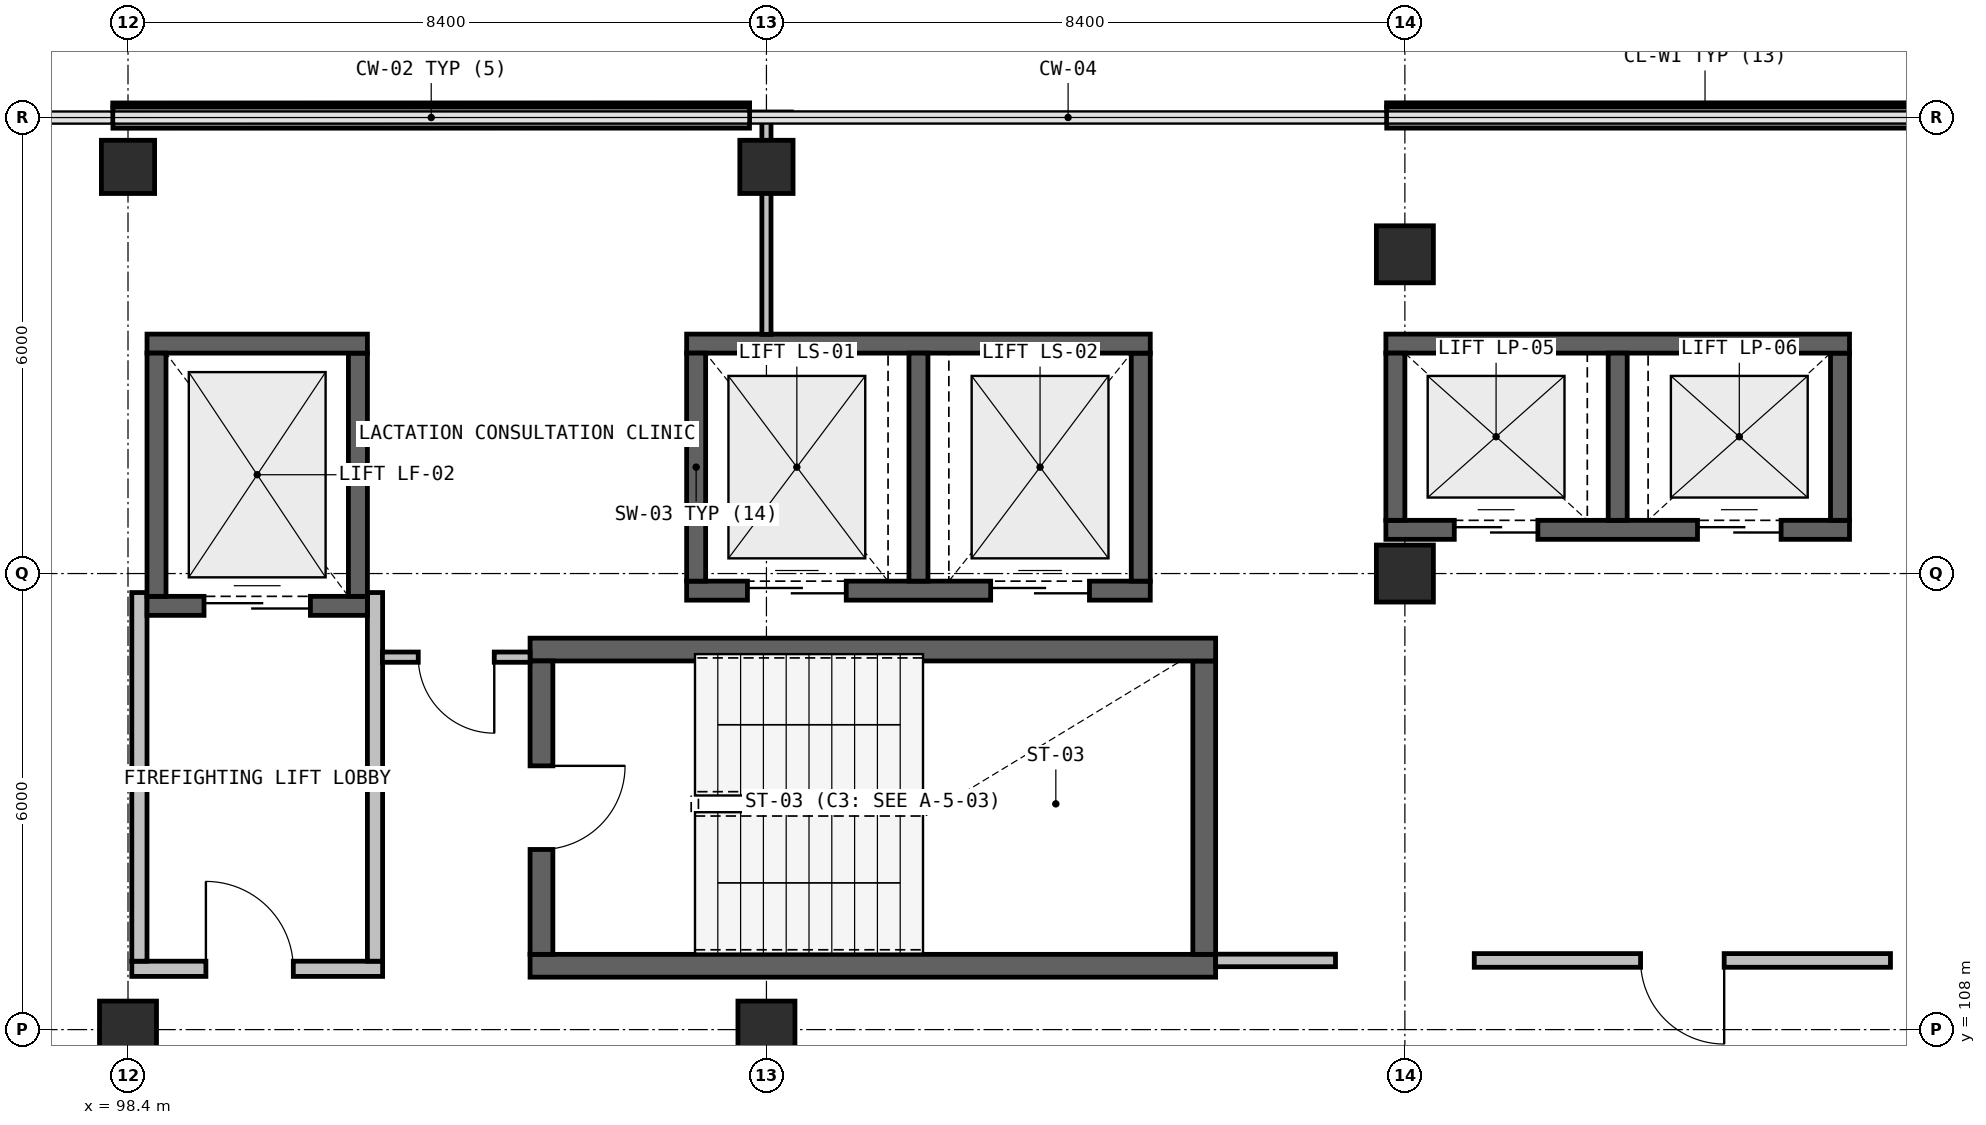
"""IFC4 building model, lengths in metres.
Left out: names, types, materials, properties, quantities, classifications, styles, units other than length and angle.
Written with IfcOpenShell. Run it as: python <this file> out.ifc"""

import sys

from ifc_helpers import new_model, si_unit, direction, frame, frame_2d, origin, origin_2d, place, context, subcontext, project, spatial, rectangle, extrude, element, fill, save


model = new_model("IFC4")
c1 = context("Model", 3, precision=1e-05, world=origin(), true_north=direction((0.0, 1.0)))
c2 = subcontext(c1, "Body", "Model", "MODEL_VIEW")
j1 = project(units=[si_unit("LENGTHUNIT", "METRE"), si_unit("PLANEANGLEUNIT", "RADIAN")], contexts=[c1])
p1 = place(None, origin())
s1 = spatial("IfcSite", under=j1, at=p1, CompositionType="ELEMENT")
p2 = place(p1, origin())
s2 = spatial("IfcBuilding", under=s1, at=p2, CompositionType="ELEMENT")
p3 = place(p2, frame((0.0, 0.0, 19.2)))
s3 = spatial("IfcBuildingStorey", under=s2, at=p3, CompositionType="ELEMENT", Elevation=19.2)
for number, where, z_axis, x_axis in (
    (1, (115.2, 118.2, 0.0), (0.0, 0.0, 1.0), (1.0, 0.0, 0.0)),
    (2, (98.4, 108.0, 0.0), (0.0, 0.0, 1.0), (1.0, 0.0, 0.0)),
):
    element("IfcColumn", number, at=place(p3, frame(where, z_axis=z_axis, x_axis=x_axis)), inside=s3, PredefinedType="COLUMN", context=c2, shape_type="SweptSolid", body=[
        extrude(rectangle(XDim=0.75, YDim=0.75, at=origin_2d()), origin(), (0.0, 0.0, 1.0), 4.05),
    ])
p4 = place(p3, frame((98.4, 119.35, 0.0), z_axis=(0.0, 0.0, 1.0), x_axis=(1.0, 0.0, 0.0)))
e3 = element("IfcColumn", 3, at=p4, inside=s3, PredefinedType="COLUMN", context=c2, shape_type="SweptSolid", body=[
    extrude(rectangle(XDim=0.7, YDim=0.7, at=origin_2d()), origin(), (0.0, 0.0, 1.0), 4.05),
])
p5 = place(p3, frame((106.8, 108.0, 0.0), z_axis=(0.0, 0.0, 1.0), x_axis=(1.0, 0.0, 0.0)))
e4 = element("IfcColumn", 4, at=p5, inside=s3, PredefinedType="COLUMN", context=c2, shape_type="SweptSolid", body=[
    extrude(rectangle(XDim=0.75, YDim=0.75, at=origin_2d()), origin(), (0.0, 0.0, 1.0), 4.05),
])
p6 = place(p3, frame((106.8, 119.35, 0.0), z_axis=(0.0, 0.0, 1.0), x_axis=(1.0, 0.0, 0.0)))
e5 = element("IfcColumn", 5, at=p6, inside=s3, PredefinedType="COLUMN", context=c2, shape_type="SweptSolid", body=[
    extrude(rectangle(XDim=0.7, YDim=0.7, at=origin_2d()), origin(), (0.0, 0.0, 1.0), 4.05),
])
p7 = place(p3, frame((115.2, 114.0, 0.0), z_axis=(0.0, 0.0, 1.0), x_axis=(1.0, 0.0, 0.0)))
e6 = element("IfcColumn", 6, at=p7, inside=s3, PredefinedType="COLUMN", context=c2, shape_type="SweptSolid", body=[
    extrude(rectangle(XDim=0.75, YDim=0.75, at=origin_2d()), origin(), (0.0, 0.0, 1.0), 4.05),
])
p8 = place(p3, frame((98.202, 119.999, 0.0), z_axis=(0.0, 0.0, 1.0), x_axis=(0.999999993202, 0.000116604477, 0.0)))
e7 = element("IfcWall", 7, at=p8, inside=s3, PredefinedType="SOLIDWALL", context=c2, shape_type="SweptSolid", body=[
    extrude(rectangle(XDim=8.375, YDim=0.28, at=frame_2d((4.188, 0.0))), origin(), (0.0, 0.0, 1.0), 0.94),
])
p9 = place(p3, frame((114.961, 120.0, 0.0), z_axis=(0.0, 0.0, 1.0), x_axis=(1.0, 0.0, 0.0)))
e8 = element("IfcWall", 8, at=p9, inside=s3, PredefinedType="SOLIDWALL", context=c2, shape_type="SweptSolid", body=[
    extrude(rectangle(XDim=8.376, YDim=0.28, at=frame_2d((4.188, 0.0))), origin(), (0.0, 0.0, 1.0), 0.94),
])
p10 = place(p3, frame((98.45, 108.8, 0.0), z_axis=(0.0, 0.0, 1.0), x_axis=(1.0, 0.0, 0.0)))
e9 = element("IfcWall", 9, at=p10, inside=s3, PredefinedType="SOLIDWALL", context=c2, shape_type="SweptSolid", body=[
    extrude(rectangle(XDim=3.3, YDim=0.2, at=frame_2d((1.65, 0.0))), origin(), (0.0, 0.0, 1.0), 3.77),
])
p11 = place(p10, frame((0.975, 0.0, 0.0)))
e10 = element("IfcOpeningElement", 10, at=p11, cuts=e9, PredefinedType="OPENING", context=c2, shape_type="SweptSolid", body=[
    extrude(rectangle(XDim=1.15, YDim=2.15, at=frame_2d((0.575, 1.075))), frame((0.0, 0.11, 0.0), z_axis=(0.0, -1.0, 0.0), x_axis=(1.0, 0.0, 0.0)), (0.0, 0.0, 1.0), 0.22),
])
p12 = place(p3, frame((101.65, 108.9, 0.0), z_axis=(0.0, 0.0, 1.0), x_axis=(0.0, 1.0, 0.0)))
e11 = element("IfcWall", 11, at=p12, inside=s3, PredefinedType="SOLIDWALL", context=c2, shape_type="SweptSolid", body=[
    extrude(rectangle(XDim=4.85, YDim=0.2, at=frame_2d((2.425, 0.0))), origin(), (0.0, 0.0, 1.0), 3.77),
])
p13 = place(p3, frame((98.55, 113.75, 0.0), z_axis=(0.0, 0.0, 1.0), x_axis=(0.0, -1.0, 0.0)))
e12 = element("IfcWall", 12, at=p13, inside=s3, PredefinedType="SOLIDWALL", context=c2, shape_type="SweptSolid", body=[
    extrude(rectangle(XDim=4.85, YDim=0.2, at=frame_2d((2.425, 0.0))), origin(), (0.0, 0.0, 1.0), 3.12),
])
p14 = place(p3, frame((103.69, 108.84, 0.0), z_axis=(0.0, 0.0, 1.0), x_axis=(1.0, 0.0, 0.0)))
e13 = element("IfcWall", 13, at=p14, inside=s3, PredefinedType="SHEAR", context=c2, shape_type="SweptSolid", body=[
    extrude(rectangle(XDim=9.02, YDim=0.3, at=frame_2d((4.51, 0.0))), origin(), (0.0, 0.0, 1.0), 3.77),
])
p15 = place(p3, frame((112.56, 108.99, 0.0), z_axis=(0.0, 0.0, 1.0), x_axis=(0.0, 1.0, 0.0)))
e14 = element("IfcWall", 14, at=p15, inside=s3, PredefinedType="SHEAR", context=c2, shape_type="SweptSolid", body=[
    extrude(rectangle(XDim=3.86, YDim=0.3, at=frame_2d((1.93, 0.0))), origin(), (0.0, 0.0, 1.0), 3.77),
])
p16 = place(p3, frame((112.71, 113.0, 0.0), z_axis=(0.0, 0.0, 1.0), x_axis=(-1.0, 0.0, 0.0)))
e15 = element("IfcWall", 15, at=p16, inside=s3, PredefinedType="SHEAR", context=c2, shape_type="SweptSolid", body=[
    extrude(rectangle(XDim=9.02, YDim=0.3, at=frame_2d((4.51, 0.0))), origin(), (0.0, 0.0, 1.0), 3.77),
])
p17 = place(p3, frame((103.84, 112.85, 0.0), z_axis=(0.0, 0.0, 1.0), x_axis=(0.0, -1.0, 0.0)))
e16 = element("IfcWall", 16, at=p17, inside=s3, PredefinedType="SHEAR", context=c2, shape_type="SweptSolid", body=[
    extrude(rectangle(XDim=3.86, YDim=0.3, at=frame_2d((1.93, 0.0))), origin(), (0.0, 0.0, 1.0), 3.77),
])
p18 = place(p17, frame((1.38, 0.0, 0.0)))
e17 = element("IfcOpeningElement", 17, at=p18, cuts=e16, PredefinedType="OPENING", context=c2, shape_type="SweptSolid", body=[
    extrude(rectangle(XDim=1.1, YDim=2.15, at=frame_2d((0.55, 1.075))), frame((0.0, 0.16, 0.0), z_axis=(0.0, -1.0, 0.0), x_axis=(1.0, 0.0, 0.0)), (0.0, 0.0, 1.0), 0.32),
])
p19 = place(p3, frame((98.65, 113.575, 0.0), z_axis=(0.0, 0.0, 1.0), x_axis=(1.0, 0.0, 0.0)))
e18 = element("IfcWall", 18, at=p19, inside=s3, PredefinedType="SHEAR", context=c2, shape_type="SweptSolid", body=[
    extrude(rectangle(XDim=2.9, YDim=0.25, at=frame_2d((1.45, 0.0))), origin(), (0.0, 0.0, 1.0), 3.77),
])
p20 = place(p19, frame((0.75, 0.0, 0.0)))
e19 = element("IfcOpeningElement", 19, at=p20, cuts=e18, PredefinedType="OPENING", context=c2, shape_type="SweptSolid", body=[
    extrude(rectangle(XDim=1.4, YDim=2.15, at=frame_2d((0.7, 1.075))), frame((0.0, 0.135, 0.0), z_axis=(0.0, -1.0, 0.0), x_axis=(1.0, 0.0, 0.0)), (0.0, 0.0, 1.0), 0.27),
])
p21 = place(p3, frame((101.425, 113.7, 0.0), z_axis=(0.0, 0.0, 1.0), x_axis=(0.0, 1.0, 0.0)))
e20 = element("IfcWall", 20, at=p21, inside=s3, PredefinedType="SHEAR", context=c2, shape_type="SweptSolid", body=[
    extrude(rectangle(XDim=3.2, YDim=0.25, at=frame_2d((1.6, 0.0))), origin(), (0.0, 0.0, 1.0), 3.77),
])
p22 = place(p3, frame((101.55, 117.025, 0.0), z_axis=(0.0, 0.0, 1.0), x_axis=(-1.0, 0.0, 0.0)))
e21 = element("IfcWall", 21, at=p22, inside=s3, PredefinedType="SHEAR", context=c2, shape_type="SweptSolid", body=[
    extrude(rectangle(XDim=2.9, YDim=0.25, at=frame_2d((1.45, 0.0))), origin(), (0.0, 0.0, 1.0), 3.77),
])
p23 = place(p3, frame((98.775, 116.9, 0.0), z_axis=(0.0, 0.0, 1.0), x_axis=(0.0, -1.0, 0.0)))
e22 = element("IfcWall", 22, at=p23, inside=s3, PredefinedType="SHEAR", context=c2, shape_type="SweptSolid", body=[
    extrude(rectangle(XDim=3.2, YDim=0.25, at=frame_2d((1.6, 0.0))), origin(), (0.0, 0.0, 1.0), 3.77),
])
p24 = place(p3, frame((105.75, 113.775, 0.0), z_axis=(0.0, 0.0, 1.0), x_axis=(1.0, 0.0, 0.0)))
e23 = element("IfcWall", 23, at=p24, inside=s3, PredefinedType="SHEAR", context=c2, shape_type="SweptSolid", body=[
    extrude(rectangle(XDim=6.1, YDim=0.25, at=frame_2d((3.05, 0.0))), origin(), (0.0, 0.0, 1.0), 3.77),
])
p25 = place(p24, frame((0.8, 0.0, 0.0)))
e24 = element("IfcOpeningElement", 24, at=p25, cuts=e23, PredefinedType="OPENING", context=c2, shape_type="SweptSolid", body=[
    extrude(rectangle(XDim=1.3, YDim=2.15, at=frame_2d((0.65, 1.075))), frame((0.0, 0.135, 0.0), z_axis=(0.0, -1.0, 0.0), x_axis=(1.0, 0.0, 0.0)), (0.0, 0.0, 1.0), 0.27),
])
p26 = place(p24, frame((4.0, 0.0, 0.0)))
e25 = element("IfcOpeningElement", 25, at=p26, cuts=e23, PredefinedType="OPENING", context=c2, shape_type="SweptSolid", body=[
    extrude(rectangle(XDim=1.3, YDim=2.15, at=frame_2d((0.65, 1.075))), frame((0.0, 0.135, 0.0), z_axis=(0.0, -1.0, 0.0), x_axis=(1.0, 0.0, 0.0)), (0.0, 0.0, 1.0), 0.27),
])
p27 = place(p3, frame((111.725, 113.9, 0.0), z_axis=(0.0, 0.0, 1.0), x_axis=(0.0, 1.0, 0.0)))
e26 = element("IfcWall", 26, at=p27, inside=s3, PredefinedType="SHEAR", context=c2, shape_type="SweptSolid", body=[
    extrude(rectangle(XDim=3.0, YDim=0.25, at=frame_2d((1.5, 0.0))), origin(), (0.0, 0.0, 1.0), 3.77),
])
p28 = place(p3, frame((111.85, 117.025, 0.0), z_axis=(0.0, 0.0, 1.0), x_axis=(-1.0, 0.0, 0.0)))
e27 = element("IfcWall", 27, at=p28, inside=s3, PredefinedType="SHEAR", context=c2, shape_type="SweptSolid", body=[
    extrude(rectangle(XDim=6.1, YDim=0.25, at=frame_2d((3.05, 0.0))), origin(), (0.0, 0.0, 1.0), 3.77),
])
for number, where, z_axis, x_axis in (
    (28, (105.875, 116.9, 0.0), (0.0, 0.0, 1.0), (0.0, -1.0, 0.0)),
    (29, (108.8, 113.9, 0.0), (0.0, 0.0, 1.0), (0.0, 1.0, 0.0)),
):
    element("IfcWall", number, at=place(p3, frame(where, z_axis=z_axis, x_axis=x_axis)), inside=s3, PredefinedType="SHEAR", context=c2, shape_type="SweptSolid", body=[
        extrude(rectangle(XDim=3.0, YDim=0.25, at=frame_2d((1.5, 0.0))), origin(), (0.0, 0.0, 1.0), 3.77),
    ])
p29 = place(p3, frame((114.95, 114.575, 0.0), z_axis=(0.0, 0.0, 1.0), x_axis=(1.0, 0.0, 0.0)))
e30 = element("IfcWall", 30, at=p29, inside=s3, PredefinedType="SHEAR", context=c2, shape_type="SweptSolid", body=[
    extrude(rectangle(XDim=6.1, YDim=0.25, at=frame_2d((3.05, 0.0))), origin(), (0.0, 0.0, 1.0), 3.77),
])
p30 = place(p29, frame((0.9, 0.0, 0.0)))
e31 = element("IfcOpeningElement", 31, at=p30, cuts=e30, PredefinedType="OPENING", context=c2, shape_type="SweptSolid", body=[
    extrude(rectangle(XDim=1.1, YDim=2.15, at=frame_2d((0.55, 1.075))), frame((0.0, 0.135, 0.0), z_axis=(0.0, -1.0, 0.0), x_axis=(1.0, 0.0, 0.0)), (0.0, 0.0, 1.0), 0.27),
])
p31 = place(p29, frame((4.1, 0.0, 0.0)))
e32 = element("IfcOpeningElement", 32, at=p31, cuts=e30, PredefinedType="OPENING", context=c2, shape_type="SweptSolid", body=[
    extrude(rectangle(XDim=1.1, YDim=2.15, at=frame_2d((0.55, 1.075))), frame((0.0, 0.135, 0.0), z_axis=(0.0, -1.0, 0.0), x_axis=(1.0, 0.0, 0.0)), (0.0, 0.0, 1.0), 0.27),
])
p32 = place(p3, frame((120.925, 114.7, 0.0), z_axis=(0.0, 0.0, 1.0), x_axis=(0.0, 1.0, 0.0)))
e33 = element("IfcWall", 33, at=p32, inside=s3, PredefinedType="SHEAR", context=c2, shape_type="SweptSolid", body=[
    extrude(rectangle(XDim=2.2, YDim=0.25, at=frame_2d((1.1, 0.0))), origin(), (0.0, 0.0, 1.0), 3.77),
])
p33 = place(p3, frame((121.05, 117.025, 0.0), z_axis=(0.0, 0.0, 1.0), x_axis=(-1.0, 0.0, 0.0)))
e34 = element("IfcWall", 34, at=p33, inside=s3, PredefinedType="SHEAR", context=c2, shape_type="SweptSolid", body=[
    extrude(rectangle(XDim=6.1, YDim=0.25, at=frame_2d((3.05, 0.0))), origin(), (0.0, 0.0, 1.0), 3.77),
])
for number, where, z_axis, x_axis in (
    (35, (115.075, 116.9, 0.0), (0.0, 0.0, 1.0), (0.0, -1.0, 0.0)),
    (36, (118.0, 114.7, 0.0), (0.0, 0.0, 1.0), (0.0, 1.0, 0.0)),
):
    element("IfcWall", number, at=place(p3, frame(where, z_axis=z_axis, x_axis=x_axis)), inside=s3, PredefinedType="SHEAR", context=c2, shape_type="SweptSolid", body=[
        extrude(rectangle(XDim=2.2, YDim=0.25, at=frame_2d((1.1, 0.0))), origin(), (0.0, 0.0, 1.0), 3.77),
    ])
p34 = place(p3, frame((103.69, 112.9, 0.0), z_axis=(0.0, 0.0, 1.0), x_axis=(-1.0, 0.0, 0.0)))
e37 = element("IfcWall", 37, at=p34, inside=s3, PredefinedType="PARTITIONING", context=c2, shape_type="SweptSolid", body=[
    extrude(rectangle(XDim=1.943, YDim=0.135, at=frame_2d((0.971, 0.0))), origin(), (0.0, 0.0, 1.0), 3.77),
])
p35 = place(p34, frame((0.471, 0.0, 0.0)))
e38 = element("IfcOpeningElement", 38, at=p35, cuts=e37, PredefinedType="OPENING", context=c2, shape_type="SweptSolid", body=[
    extrude(rectangle(XDim=1.0, YDim=2.15, at=frame_2d((0.5, 1.075))), frame((0.0, 0.077, 0.0), z_axis=(0.0, -1.0, 0.0), x_axis=(1.0, 0.0, 0.0)), (0.0, 0.0, 1.0), 0.155),
])
p36 = place(p3, frame((106.8, 119.989, 0.0), z_axis=(0.0, 0.0, 1.0), x_axis=(0.0, -1.0, 0.0)))
e39 = element("IfcWall", 39, at=p36, inside=s3, PredefinedType="PARTITIONING", context=c2, shape_type="SweptSolid", body=[
    extrude(rectangle(XDim=2.842, YDim=0.12, at=frame_2d((1.421, 0.0))), origin(), (0.0, 0.0, 1.0), 3.77),
])
p37 = place(p3, frame((121.589, 108.91, 0.0), z_axis=(0.0, 0.0, 1.0), x_axis=(-1.0, 0.0, 0.0)))
e40 = element("IfcWall", 40, at=p37, inside=s3, PredefinedType="PARTITIONING", context=c2, shape_type="SweptSolid", body=[
    extrude(rectangle(XDim=5.476, YDim=0.18, at=frame_2d((2.738, 0.0))), origin(), (0.0, 0.0, 1.0), 3.77),
])
p38 = place(p37, frame((2.188, 0.0, 0.0)))
e41 = element("IfcOpeningElement", 41, at=p38, cuts=e40, PredefinedType="OPENING", context=c2, shape_type="SweptSolid", body=[
    extrude(rectangle(XDim=1.1, YDim=2.15, at=frame_2d((0.55, 1.075))), frame((0.0, 0.1, 0.0), z_axis=(0.0, -1.0, 0.0), x_axis=(1.0, 0.0, 0.0)), (0.0, 0.0, 1.0), 0.2),
])
p39 = place(p3, frame((114.287, 108.91, 0.0), z_axis=(0.0, 0.0, 1.0), x_axis=(-1.0, 0.0, 0.0)))
e42 = element("IfcWall", 42, at=p39, inside=s3, PredefinedType="PARTITIONING", context=c2, shape_type="SweptSolid", body=[
    extrude(rectangle(XDim=1.577, YDim=0.165, at=frame_2d((0.789, 0.0))), origin(), (0.0, 0.0, 1.0), 3.77),
])
p40 = place(p11, origin())
e43 = element("IfcDoor", 43, at=p40, inside=s3, OperationType="SINGLE_SWING_RIGHT", PredefinedType="DOOR", context=c2, shape_type="SweptSolid", body=[
    extrude(rectangle(XDim=1.15, YDim=2.15, at=frame_2d((0.575, 1.075))), frame((0.0, 0.025, 0.0), z_axis=(0.0, -1.0, 0.0), x_axis=(1.0, 0.0, 0.0)), (0.0, 0.0, 1.0), 0.05),
])
fill(e10, e43)
p41 = place(p18, origin())
e44 = element("IfcDoor", 44, at=p41, inside=s3, OperationType="SINGLE_SWING_RIGHT", PredefinedType="DOOR", context=c2, shape_type="SweptSolid", body=[
    extrude(rectangle(XDim=1.1, YDim=2.15, at=frame_2d((0.55, 1.075))), frame((0.0, 0.025, 0.0), z_axis=(0.0, -1.0, 0.0), x_axis=(1.0, 0.0, 0.0)), (0.0, 0.0, 1.0), 0.05),
])
fill(e17, e44)
p42 = place(p20, origin())
e45 = element("IfcDoor", 45, at=p42, inside=s3, OperationType="DOUBLE_DOOR_SLIDING", PredefinedType="DOOR", context=c2, shape_type="SweptSolid", body=[
    extrude(rectangle(XDim=1.4, YDim=2.15, at=frame_2d((0.7, 1.075))), frame((0.0, 0.025, 0.0), z_axis=(0.0, -1.0, 0.0), x_axis=(1.0, 0.0, 0.0)), (0.0, 0.0, 1.0), 0.05),
])
fill(e19, e45)
p43 = place(p25, origin())
e46 = element("IfcDoor", 46, at=p43, inside=s3, OperationType="DOUBLE_DOOR_SLIDING", PredefinedType="DOOR", context=c2, shape_type="SweptSolid", body=[
    extrude(rectangle(XDim=1.3, YDim=2.15, at=frame_2d((0.65, 1.075))), frame((0.0, 0.025, 0.0), z_axis=(0.0, -1.0, 0.0), x_axis=(1.0, 0.0, 0.0)), (0.0, 0.0, 1.0), 0.05),
])
fill(e24, e46)
p44 = place(p26, origin())
e47 = element("IfcDoor", 47, at=p44, inside=s3, OperationType="DOUBLE_DOOR_SLIDING", PredefinedType="DOOR", context=c2, shape_type="SweptSolid", body=[
    extrude(rectangle(XDim=1.3, YDim=2.15, at=frame_2d((0.65, 1.075))), frame((0.0, 0.025, 0.0), z_axis=(0.0, -1.0, 0.0), x_axis=(1.0, 0.0, 0.0)), (0.0, 0.0, 1.0), 0.05),
])
fill(e25, e47)
p45 = place(p30, origin())
e48 = element("IfcDoor", 48, at=p45, inside=s3, OperationType="DOUBLE_DOOR_SLIDING", PredefinedType="DOOR", context=c2, shape_type="SweptSolid", body=[
    extrude(rectangle(XDim=1.1, YDim=2.15, at=frame_2d((0.55, 1.075))), frame((0.0, 0.025, 0.0), z_axis=(0.0, -1.0, 0.0), x_axis=(1.0, 0.0, 0.0)), (0.0, 0.0, 1.0), 0.05),
])
fill(e31, e48)
p46 = place(p31, origin())
e49 = element("IfcDoor", 49, at=p46, inside=s3, OperationType="DOUBLE_DOOR_SLIDING", PredefinedType="DOOR", context=c2, shape_type="SweptSolid", body=[
    extrude(rectangle(XDim=1.1, YDim=2.15, at=frame_2d((0.55, 1.075))), frame((0.0, 0.025, 0.0), z_axis=(0.0, -1.0, 0.0), x_axis=(1.0, 0.0, 0.0)), (0.0, 0.0, 1.0), 0.05),
])
fill(e32, e49)
p47 = place(p35, origin())
e50 = element("IfcDoor", 50, at=p47, inside=s3, OperationType="SINGLE_SWING_LEFT", PredefinedType="DOOR", context=c2, shape_type="SweptSolid", body=[
    extrude(rectangle(XDim=1.0, YDim=2.15, at=frame_2d((0.5, 1.075))), frame((0.0, 0.025, 0.0), z_axis=(0.0, -1.0, 0.0), x_axis=(1.0, 0.0, 0.0)), (0.0, 0.0, 1.0), 0.05),
])
fill(e38, e50)
p48 = place(p38, origin())
e51 = element("IfcDoor", 51, at=p48, inside=s3, OperationType="SINGLE_SWING_RIGHT", PredefinedType="DOOR", context=c2, shape_type="SweptSolid", body=[
    extrude(rectangle(XDim=1.1, YDim=2.15, at=frame_2d((0.55, 1.075))), frame((0.0, 0.025, 0.0), z_axis=(0.0, -1.0, 0.0), x_axis=(1.0, 0.0, 0.0)), (0.0, 0.0, 1.0), 0.05),
])
fill(e41, e51)
save(model, sys.argv[1])
